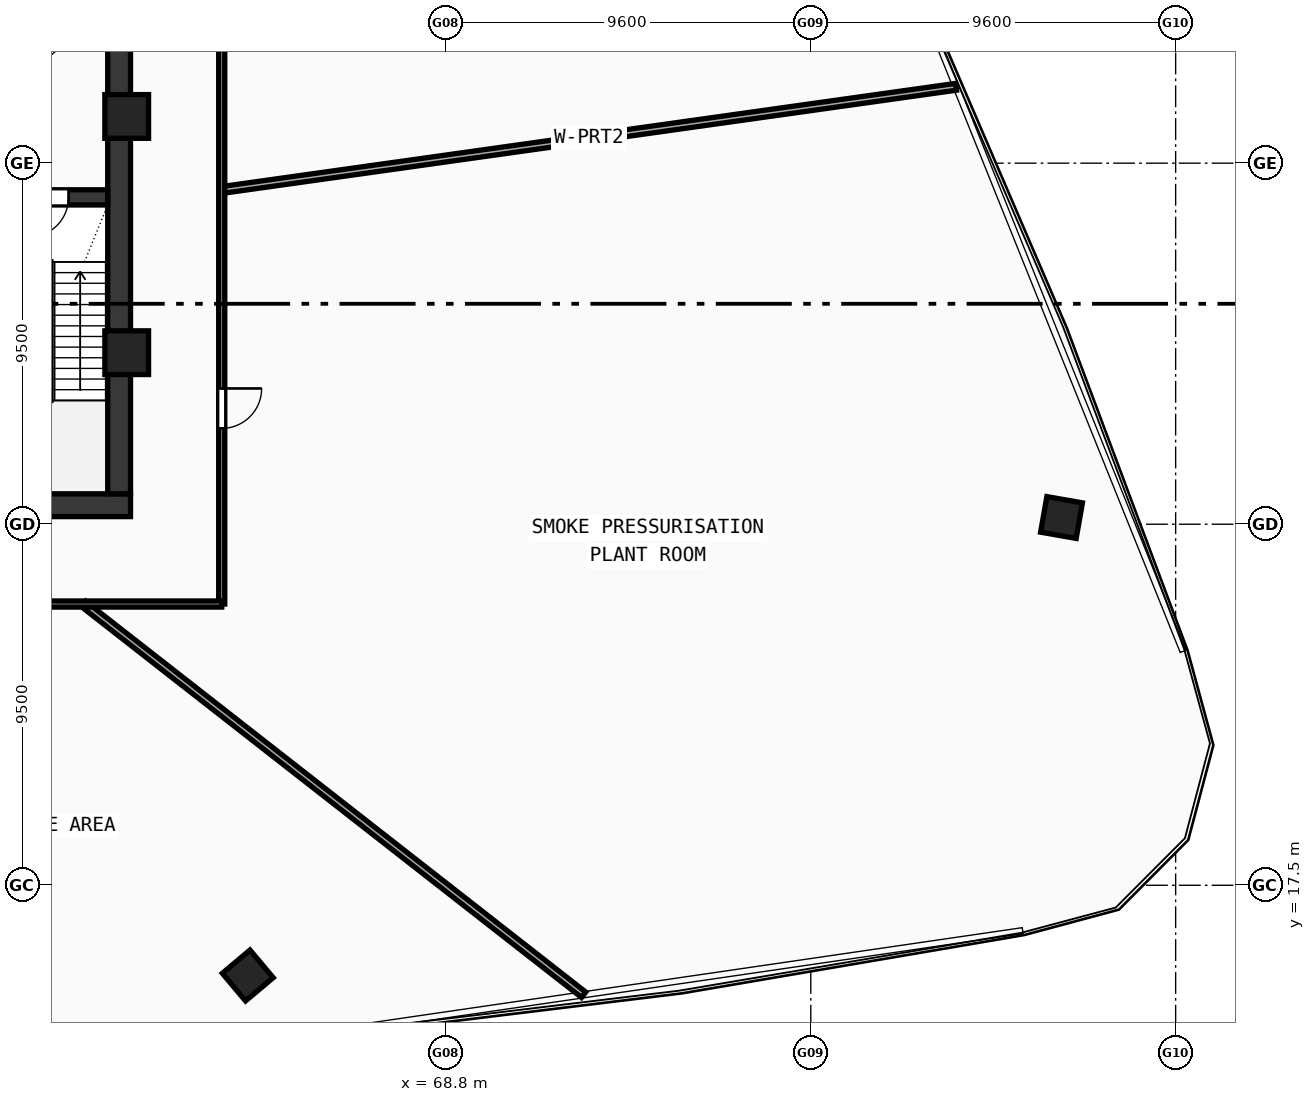
"""IFC4 building model, lengths in metres.
Left out: names, types, materials, properties, quantities, classifications, styles, units other than length and angle.
Written with IfcOpenShell. Run it as: python <this file> out.ifc"""

import sys

from ifc_helpers import new_model, si_unit, direction, frame, frame_2d, origin, origin_with_axes, origin_2d, place, context, subcontext, project, spatial, rectangle, hollow_rectangle, extrude, source, transform, mapped, element, fill, save


model = new_model("IFC4")
c1 = context("Model", 3, precision=1e-05, world=origin(), true_north=direction((0.0, 1.0)))
c2 = subcontext(c1, "Body", "Model", "MODEL_VIEW")
j1 = project(units=[si_unit("LENGTHUNIT", "METRE"), si_unit("PLANEANGLEUNIT", "RADIAN")], contexts=[c1])
p1 = place(None, origin())
s1 = spatial("IfcSite", under=j1, at=p1, CompositionType="ELEMENT")
p2 = place(p1, origin())
s2 = spatial("IfcBuilding", under=s1, at=p2, CompositionType="ELEMENT")
p3 = place(p2, frame((0.0, 0.0, 125.03)))
s3 = spatial("IfcBuildingStorey", under=s2, at=p3, CompositionType="ELEMENT", Elevation=125.03)
p4 = place(p3, frame((35.5, 27.5, 0.0), z_axis=(0.0, 0.0, 1.0), x_axis=(1.0, 0.0, 0.0)))
e1 = element("IfcWall", 1, at=p4, inside=s3, PredefinedType="SHEAR", context=c2, shape_type="SweptSolid", body=[
    extrude(rectangle(XDim=25.0, YDim=0.6, at=frame_2d((12.5, 0.0))), origin(), (0.0, 0.0, 1.0), 4.54),
])
p5 = place(p3, frame((60.2, 27.8, 0.0), z_axis=(0.0, 0.0, 1.0), x_axis=(0.0, 1.0, 0.0)))
e2 = element("IfcWall", 2, at=p5, inside=s3, PredefinedType="SHEAR", context=c2, shape_type="SweptSolid", body=[
    extrude(rectangle(XDim=12.1, YDim=0.6, at=frame_2d((6.05, 0.0))), origin(), (0.0, 0.0, 1.0), 4.54),
])
p6 = place(p3, frame((56.8, 35.6, 0.0), z_axis=(0.0, 0.0, 1.0), x_axis=(1.0, 0.0, 0.0)))
e3 = element("IfcWall", 3, at=p6, inside=s3, PredefinedType="SHEAR", context=c2, shape_type="SweptSolid", body=[
    extrude(rectangle(XDim=3.1, YDim=0.4, at=frame_2d((1.55, 0.0))), origin(), (0.0, 0.0, 1.0), 4.54),
])
p7 = place(p6, frame((1.02, 0.0, 0.0)))
e4 = element("IfcOpeningElement", 4, at=p7, cuts=e3, PredefinedType="OPENING", context=c2, shape_type="SweptSolid", body=[
    extrude(rectangle(XDim=1.05, YDim=2.1, at=frame_2d((0.525, 1.05))), frame((0.0, 0.21, 0.0), z_axis=(0.0, -1.0, 0.0), x_axis=(1.0, 0.0, 0.0)), (0.0, 0.0, 1.0), 0.42),
])
m1 = source(origin(), c2, "Body", "SweptSolid", [
    extrude(hollow_rectangle(XDim=1.15, YDim=1.15, WallThickness=0.048, at=origin_2d()), origin(), (0.0, 0.0, 1.0), 4.82),
])
for number, where, z_axis, x_axis in (
    (5, (60.4, 31.513, -0.28), (0.0, 0.0, 1.0), (1.0, 0.0, 0.0)),
    (6, (60.4, 37.729, -0.28), (0.0, 0.0, 1.0), (1.0, 0.0, 0.0)),
):
    element("IfcColumn", number, at=place(p3, frame(where, z_axis=z_axis, x_axis=x_axis)), inside=s3, PredefinedType="COLUMN", context=c2, shape_type="MappedRepresentation", body=[
        mapped(m1, transform((0.0, 0.0, 0.0), scale=1.0)),
    ])
m2 = source(origin(), c2, "Body", "SweptSolid", [
    extrude(hollow_rectangle(XDim=0.95, YDim=0.95, WallThickness=0.04, at=origin_2d()), origin(), (0.0, 0.0, 1.0), 4.82),
])
for number, where, z_axis, x_axis in (
    (7, (63.585, 15.126, -0.28), (0.0, 0.0, 1.0), (0.766, 0.643, 0.0)),
    (8, (84.997, 27.177, -0.28), (0.0, 0.0, 1.0), (0.174, 0.985, 0.0)),
):
    element("IfcColumn", number, at=place(p3, frame(where, z_axis=z_axis, x_axis=x_axis)), inside=s3, PredefinedType="COLUMN", context=c2, shape_type="MappedRepresentation", body=[
        mapped(m2, transform((0.0, 0.0, 0.0), scale=1.0)),
    ])
p8 = place(p3, frame((62.9, 35.794, 0.0), z_axis=(0.0, 0.0, 1.0), x_axis=(0.990268733373, 0.13916837178, 0.0)))
e9 = element("IfcWall", 9, at=p8, inside=s3, PredefinedType="PARTITIONING", context=c2, shape_type="SweptSolid", body=[
    extrude(rectangle(XDim=19.513, YDim=0.18, at=frame_2d((9.756, 0.0))), origin(), (0.0, 0.0, 1.0), 3.89),
])
p9 = place(p3, frame((59.263, 24.9, 0.0), z_axis=(0.0, 0.0, 1.0), x_axis=(0.788012847889, -0.615658794758, 0.0)))
e10 = element("IfcWall", 10, at=p9, inside=s3, PredefinedType="PARTITIONING", context=c2, shape_type="SweptSolid", body=[
    extrude(rectangle(XDim=16.699, YDim=0.18, at=frame_2d((8.35, 0.0))), origin(), (0.0, 0.0, 1.0), 3.89),
])
p10 = place(p3, frame((62.9, 42.9, 0.0), z_axis=(0.0, 0.0, 1.0), x_axis=(0.0, -1.0, 0.0)))
e11 = element("IfcWall", 11, at=p10, inside=s3, PredefinedType="PARTITIONING", context=c2, shape_type="SweptSolid", body=[
    extrude(rectangle(XDim=18.0, YDim=0.16, at=frame_2d((9.0, 0.0))), origin(), (0.0, 0.0, 1.0), 3.89),
])
p11 = place(p10, frame((12.328, 0.0, 0.0)))
e12 = element("IfcOpeningElement", 12, at=p11, cuts=e11, PredefinedType="OPENING", context=c2, shape_type="SweptSolid", body=[
    extrude(rectangle(XDim=1.05, YDim=2.1, at=frame_2d((0.525, 1.05))), frame((0.0, 0.09, 0.0), z_axis=(0.0, -1.0, 0.0), x_axis=(1.0, 0.0, 0.0)), (0.0, 0.0, 1.0), 0.18),
])
p12 = place(p3, frame((62.9, 24.9, 0.0), z_axis=(0.0, 0.0, 1.0), x_axis=(-1.0, 0.0, 0.0)))
e13 = element("IfcWall", 13, at=p12, inside=s3, PredefinedType="PARTITIONING", context=c2, shape_type="SweptSolid", body=[
    extrude(rectangle(XDim=29.8, YDim=0.16, at=frame_2d((14.9, 0.0))), origin(), (0.0, 0.0, 1.0), 3.89),
])
p13 = place(p12, frame((20.007, 0.0, 0.0)))
e14 = element("IfcOpeningElement", 14, at=p13, cuts=e13, PredefinedType="OPENING", context=c2, shape_type="SweptSolid", body=[
    extrude(rectangle(XDim=1.05, YDim=2.1, at=frame_2d((0.525, 1.05))), frame((0.0, 0.09, 0.0), z_axis=(0.0, -1.0, 0.0), x_axis=(1.0, 0.0, 0.0)), (0.0, 0.0, 1.0), 0.18),
])
p14 = place(p12, frame((8.743, 0.0, 0.0)))
e15 = element("IfcOpeningElement", 15, at=p14, cuts=e13, PredefinedType="OPENING", context=c2, shape_type="SweptSolid", body=[
    extrude(rectangle(XDim=1.05, YDim=2.1, at=frame_2d((0.525, 1.05))), frame((0.0, 0.09, 0.0), z_axis=(0.0, -1.0, 0.0), x_axis=(1.0, 0.0, 0.0)), (0.0, 0.0, 1.0), 0.18),
])
m3 = source(origin(), c2, "Body", "SweptSolid", [
    extrude(rectangle(XDim=1.05, YDim=2.1, at=frame_2d((0.525, 1.05))), frame((0.0, 0.025, 0.0), z_axis=(0.0, -1.0, 0.0), x_axis=(1.0, 0.0, 0.0)), (0.0, 0.0, 1.0), 0.05),
])
p15 = place(p7, frame((1.05, 0.0, 0.0), z_axis=(0.0, 0.0, 1.0), x_axis=(-1.0, 0.0, 0.0)))
e16 = element("IfcDoor", 16, at=p15, inside=s3, OperationType="SINGLE_SWING_RIGHT", PredefinedType="DOOR", context=c2, shape_type="MappedRepresentation", body=[
    mapped(m3, transform((0.0, 0.0, 0.0), scale=1.0)),
])
fill(e4, e16)
p16 = place(p11, origin_with_axes())
e17 = element("IfcDoor", 17, at=p16, inside=s3, OperationType="SINGLE_SWING_LEFT", PredefinedType="DOOR", context=c2, shape_type="MappedRepresentation", body=[
    mapped(m3, transform((0.0, 0.0, 0.0), scale=1.0)),
])
fill(e12, e17)
save(model, sys.argv[1])
